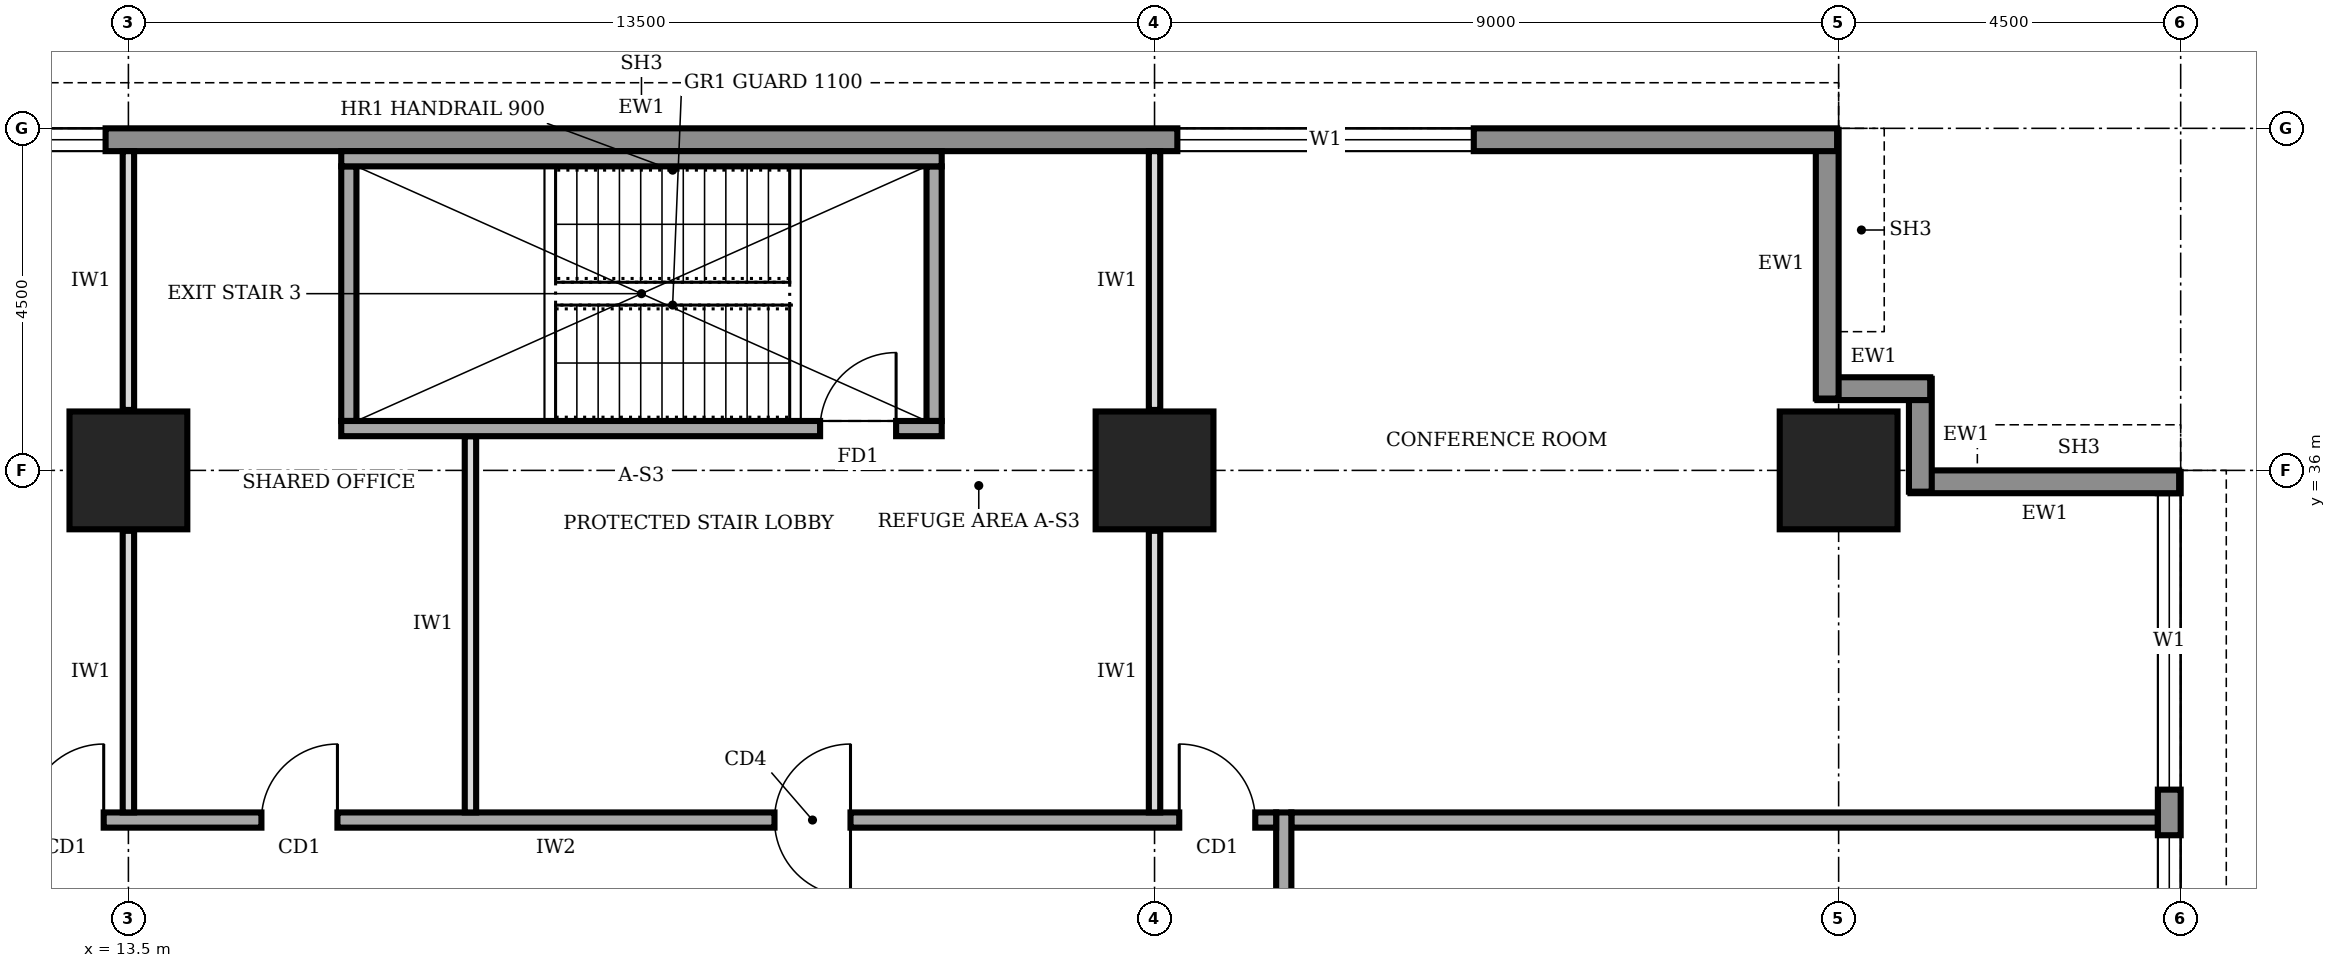
"""IFC4 building model, lengths in metres.
Left out: names, types, materials, properties, quantities, classifications, styles, units other than length and angle.
Written with IfcOpenShell. Run it as: python <this file> out.ifc"""

import sys

from ifc_helpers import new_model, si_unit, direction, frame, frame_2d, origin, origin_2d, place, context, subcontext, project, spatial, rectangle, extrude, element, fill, save


model = new_model("IFC4")
c1 = context("Model", 3, precision=1e-05, world=origin(), true_north=direction((0.0, 1.0)))
c2 = subcontext(c1, "Body", "Model", "MODEL_VIEW")
j1 = project(units=[si_unit("LENGTHUNIT", "METRE"), si_unit("PLANEANGLEUNIT", "RADIAN")], contexts=[c1])
p1 = place(None, origin())
s1 = spatial("IfcSite", under=j1, at=p1, CompositionType="ELEMENT")
p2 = place(p1, origin())
s2 = spatial("IfcBuilding", under=s1, at=p2, CompositionType="ELEMENT")
p3 = place(p2, frame((0.0, 0.0, 209.0)))
s3 = spatial("IfcBuildingStorey", under=s2, at=p3, CompositionType="ELEMENT", Elevation=209.0)
for number, where, z_axis, x_axis in (
    (1, (13.5, 36.0, 0.0), (0.0, 0.0, 1.0), (1.0, 0.0, 0.0)),
    (2, (27.0, 36.0, 0.0), (0.0, 0.0, 1.0), (1.0, 0.0, 0.0)),
    (3, (36.0, 36.0, 0.0), (0.0, 0.0, 1.0), (1.0, 0.0, 0.0)),
):
    element("IfcColumn", number, at=place(p3, frame(where, z_axis=z_axis, x_axis=x_axis)), inside=s3, PredefinedType="COLUMN", context=c2, shape_type="SweptSolid", body=[
        extrude(rectangle(XDim=1.55, YDim=1.55, at=origin_2d()), origin(), (0.0, 0.0, 1.0), 4.0),
    ])
p4 = place(p3, frame((40.35, 4.52, 0.0), z_axis=(0.0, 0.0, 1.0), x_axis=(0.0, 1.0, 0.0)))
e4 = element("IfcWall", 4, at=p4, inside=s3, PredefinedType="STANDARD", context=c2, shape_type="SweptSolid", body=[
    extrude(rectangle(XDim=31.46, YDim=0.3, at=frame_2d((15.73, 0.0))), origin(), (0.0, 0.0, 1.0), 3.75),
])
p5 = place(p4, frame((4.78, 0.0, 0.9)))
e5 = element("IfcOpeningElement", 5, at=p5, cuts=e4, PredefinedType="OPENING", context=c2, shape_type="SweptSolid", body=[
    extrude(rectangle(XDim=3.9, YDim=2.2, at=frame_2d((1.95, 1.1))), frame((0.0, 0.16, 0.0), z_axis=(0.0, -1.0, 0.0), x_axis=(1.0, 0.0, 0.0)), (0.0, 0.0, 1.0), 0.32),
])
p6 = place(p4, frame((9.28, 0.0, 0.9)))
e6 = element("IfcOpeningElement", 6, at=p6, cuts=e4, PredefinedType="OPENING", context=c2, shape_type="SweptSolid", body=[
    extrude(rectangle(XDim=3.9, YDim=2.2, at=frame_2d((1.95, 1.1))), frame((0.0, 0.16, 0.0), z_axis=(0.0, -1.0, 0.0), x_axis=(1.0, 0.0, 0.0)), (0.0, 0.0, 1.0), 0.32),
])
p7 = place(p4, frame((13.78, 0.0, 0.9)))
e7 = element("IfcOpeningElement", 7, at=p7, cuts=e4, PredefinedType="OPENING", context=c2, shape_type="SweptSolid", body=[
    extrude(rectangle(XDim=3.9, YDim=2.2, at=frame_2d((1.95, 1.1))), frame((0.0, 0.16, 0.0), z_axis=(0.0, -1.0, 0.0), x_axis=(1.0, 0.0, 0.0)), (0.0, 0.0, 1.0), 0.32),
])
p8 = place(p4, frame((18.28, 0.0, 0.9)))
e8 = element("IfcOpeningElement", 8, at=p8, cuts=e4, PredefinedType="OPENING", context=c2, shape_type="SweptSolid", body=[
    extrude(rectangle(XDim=3.9, YDim=2.2, at=frame_2d((1.95, 1.1))), frame((0.0, 0.16, 0.0), z_axis=(0.0, -1.0, 0.0), x_axis=(1.0, 0.0, 0.0)), (0.0, 0.0, 1.0), 0.32),
])
p9 = place(p4, frame((22.78, 0.0, 0.9)))
e9 = element("IfcOpeningElement", 9, at=p9, cuts=e4, PredefinedType="OPENING", context=c2, shape_type="SweptSolid", body=[
    extrude(rectangle(XDim=3.9, YDim=2.2, at=frame_2d((1.95, 1.1))), frame((0.0, 0.16, 0.0), z_axis=(0.0, -1.0, 0.0), x_axis=(1.0, 0.0, 0.0)), (0.0, 0.0, 1.0), 0.32),
])
p10 = place(p4, frame((27.28, 0.0, 0.9)))
e10 = element("IfcOpeningElement", 10, at=p10, cuts=e4, PredefinedType="OPENING", context=c2, shape_type="SweptSolid", body=[
    extrude(rectangle(XDim=3.9, YDim=2.2, at=frame_2d((1.95, 1.1))), frame((0.0, 0.16, 0.0), z_axis=(0.0, -1.0, 0.0), x_axis=(1.0, 0.0, 0.0)), (0.0, 0.0, 1.0), 0.32),
])
p11 = place(p3, frame((40.48, 35.85, 0.0), z_axis=(0.0, 0.0, 1.0), x_axis=(-1.0, 0.0, 0.0)))
e11 = element("IfcWall", 11, at=p11, inside=s3, PredefinedType="STANDARD", context=c2, shape_type="SweptSolid", body=[
    extrude(rectangle(XDim=3.535, YDim=0.3, at=frame_2d((1.768, 0.0))), origin(), (0.0, 0.0, 1.0), 2.85),
])
for number, where, z_axis, x_axis in (
    (12, (37.075, 35.72, 0.0), (0.0, 0.0, 1.0), (0.0, 1.0, 0.0)),
    (13, (37.205, 37.075, 0.0), (0.0, 0.0, 1.0), (-1.0, 0.0, 0.0)),
):
    element("IfcWall", number, at=place(p3, frame(where, z_axis=z_axis, x_axis=x_axis)), inside=s3, PredefinedType="STANDARD", context=c2, shape_type="SweptSolid", body=[
        extrude(rectangle(XDim=1.485, YDim=0.3, at=frame_2d((0.743, 0.0))), origin(), (0.0, 0.0, 1.0), 3.75),
    ])
p12 = place(p3, frame((35.85, 36.945, 0.0), z_axis=(0.0, 0.0, 1.0), x_axis=(0.0, 1.0, 0.0)))
e14 = element("IfcWall", 14, at=p12, inside=s3, PredefinedType="STANDARD", context=c2, shape_type="SweptSolid", body=[
    extrude(rectangle(XDim=3.535, YDim=0.3, at=frame_2d((1.768, 0.0))), origin(), (0.0, 0.0, 1.0), 2.85),
])
p13 = place(p3, frame((35.98, 40.35, 0.0), z_axis=(0.0, 0.0, 1.0), x_axis=(-1.0, 0.0, 0.0)))
e15 = element("IfcWall", 15, at=p13, inside=s3, PredefinedType="STANDARD", context=c2, shape_type="SweptSolid", body=[
    extrude(rectangle(XDim=31.46, YDim=0.3, at=frame_2d((15.73, 0.0))), origin(), (0.0, 0.0, 1.0), 3.75),
])
p14 = place(p13, frame((27.28, 0.0, 0.9)))
e16 = element("IfcOpeningElement", 16, at=p14, cuts=e15, PredefinedType="OPENING", context=c2, shape_type="SweptSolid", body=[
    extrude(rectangle(XDim=3.9, YDim=2.2, at=frame_2d((1.95, 1.1))), frame((0.0, 0.16, 0.0), z_axis=(0.0, -1.0, 0.0), x_axis=(1.0, 0.0, 0.0)), (0.0, 0.0, 1.0), 0.32),
])
p15 = place(p13, frame((22.78, 0.0, 0.9)))
e17 = element("IfcOpeningElement", 17, at=p15, cuts=e15, PredefinedType="OPENING", context=c2, shape_type="SweptSolid", body=[
    extrude(rectangle(XDim=3.9, YDim=2.2, at=frame_2d((1.95, 1.1))), frame((0.0, 0.16, 0.0), z_axis=(0.0, -1.0, 0.0), x_axis=(1.0, 0.0, 0.0)), (0.0, 0.0, 1.0), 0.32),
])
p16 = place(p13, frame((4.78, 0.0, 0.9)))
e18 = element("IfcOpeningElement", 18, at=p16, cuts=e15, PredefinedType="OPENING", context=c2, shape_type="SweptSolid", body=[
    extrude(rectangle(XDim=3.9, YDim=2.2, at=frame_2d((1.95, 1.1))), frame((0.0, 0.16, 0.0), z_axis=(0.0, -1.0, 0.0), x_axis=(1.0, 0.0, 0.0)), (0.0, 0.0, 1.0), 0.32),
])
p17 = place(p3, frame((28.7, 7.7, 0.0), z_axis=(0.0, 0.0, 1.0), x_axis=(0.0, 1.0, 0.0)))
e19 = element("IfcWall", 19, at=p17, inside=s3, PredefinedType="SOLIDWALL", context=c2, shape_type="SweptSolid", body=[
    extrude(rectangle(XDim=23.8, YDim=0.2, at=frame_2d((11.9, 0.0))), origin(), (0.0, 0.0, 1.0), 3.75),
])
p18 = place(p17, frame((4.15, 0.0, 0.0)))
e20 = element("IfcOpeningElement", 20, at=p18, cuts=e19, PredefinedType="OPENING", context=c2, shape_type="SweptSolid", body=[
    extrude(rectangle(XDim=1.8, YDim=2.1, at=frame_2d((0.9, 1.05))), frame((0.0, 0.11, 0.0), z_axis=(0.0, -1.0, 0.0), x_axis=(1.0, 0.0, 0.0)), (0.0, 0.0, 1.0), 0.22),
])
p19 = place(p17, frame((16.35, 0.0, 0.0)))
e21 = element("IfcOpeningElement", 21, at=p19, cuts=e19, PredefinedType="OPENING", context=c2, shape_type="SweptSolid", body=[
    extrude(rectangle(XDim=1.4, YDim=2.1, at=frame_2d((0.7, 1.05))), frame((0.0, 0.11, 0.0), z_axis=(0.0, -1.0, 0.0), x_axis=(1.0, 0.0, 0.0)), (0.0, 0.0, 1.0), 0.22),
])
p20 = place(p3, frame((28.6, 31.4, 0.0), z_axis=(0.0, 0.0, 1.0), x_axis=(-1.0, 0.0, 0.0)))
e22 = element("IfcWall", 22, at=p20, inside=s3, PredefinedType="SOLIDWALL", context=c2, shape_type="SweptSolid", body=[
    extrude(rectangle(XDim=16.9, YDim=0.2, at=frame_2d((8.45, 0.0))), origin(), (0.0, 0.0, 1.0), 3.75),
])
p21 = place(p20, frame((15.425, 0.0, 0.0)))
e23 = element("IfcOpeningElement", 23, at=p21, cuts=e22, PredefinedType="OPENING", context=c2, shape_type="SweptSolid", body=[
    extrude(rectangle(XDim=1.0, YDim=2.1, at=frame_2d((0.5, 1.05))), frame((0.0, 0.11, 0.0), z_axis=(0.0, -1.0, 0.0), x_axis=(1.0, 0.0, 0.0)), (0.0, 0.0, 1.0), 0.22),
])
p22 = place(p20, frame((12.35, 0.0, 0.0)))
e24 = element("IfcOpeningElement", 24, at=p22, cuts=e22, PredefinedType="OPENING", context=c2, shape_type="SweptSolid", body=[
    extrude(rectangle(XDim=1.0, YDim=2.1, at=frame_2d((0.5, 1.05))), frame((0.0, 0.11, 0.0), z_axis=(0.0, -1.0, 0.0), x_axis=(1.0, 0.0, 0.0)), (0.0, 0.0, 1.0), 0.22),
])
p23 = place(p20, frame((5.6, 0.0, 0.0)))
e25 = element("IfcOpeningElement", 25, at=p23, cuts=e22, PredefinedType="OPENING", context=c2, shape_type="SweptSolid", body=[
    extrude(rectangle(XDim=1.0, YDim=2.1, at=frame_2d((0.5, 1.05))), frame((0.0, 0.11, 0.0), z_axis=(0.0, -1.0, 0.0), x_axis=(1.0, 0.0, 0.0)), (0.0, 0.0, 1.0), 0.22),
])
p24 = place(p20, frame((0.275, 0.0, 0.0)))
e26 = element("IfcOpeningElement", 26, at=p24, cuts=e22, PredefinedType="OPENING", context=c2, shape_type="SweptSolid", body=[
    extrude(rectangle(XDim=1.0, YDim=2.1, at=frame_2d((0.5, 1.05))), frame((0.0, 0.11, 0.0), z_axis=(0.0, -1.0, 0.0), x_axis=(1.0, 0.0, 0.0)), (0.0, 0.0, 1.0), 0.22),
])
p25 = place(p3, frame((28.8, 31.4, 0.0), z_axis=(0.0, 0.0, 1.0), x_axis=(1.0, 0.0, 0.0)))
e27 = element("IfcWall", 27, at=p25, inside=s3, PredefinedType="SOLIDWALL", context=c2, shape_type="SweptSolid", body=[
    extrude(rectangle(XDim=11.4, YDim=0.2, at=frame_2d((5.7, 0.0))), origin(), (0.0, 0.0, 1.0), 3.75),
])
p26 = place(p3, frame((13.5, 31.5, 0.0), z_axis=(0.0, 0.0, 1.0), x_axis=(0.0, 1.0, 0.0)))
e28 = element("IfcWall", 28, at=p26, inside=s3, PredefinedType="PARTITIONING", context=c2, shape_type="SweptSolid", body=[
    extrude(rectangle(XDim=3.705, YDim=0.15, at=frame_2d((1.853, 0.0))), origin(), (0.0, 0.0, 1.0), 2.85),
])
p27 = place(p3, frame((13.5, 36.795, 0.0), z_axis=(0.0, 0.0, 1.0), x_axis=(0.0, 1.0, 0.0)))
e29 = element("IfcWall", 29, at=p27, inside=s3, PredefinedType="PARTITIONING", context=c2, shape_type="SweptSolid", body=[
    extrude(rectangle(XDim=3.405, YDim=0.15, at=frame_2d((1.703, 0.0))), origin(), (0.0, 0.0, 1.0), 2.85),
])
p28 = place(p3, frame((18.0, 31.5, 0.0), z_axis=(0.0, 0.0, 1.0), x_axis=(0.0, 1.0, 0.0)))
e30 = element("IfcWall", 30, at=p28, inside=s3, PredefinedType="PARTITIONING", context=c2, shape_type="SweptSolid", body=[
    extrude(rectangle(XDim=4.95, YDim=0.15, at=frame_2d((2.475, 0.0))), origin(), (0.0, 0.0, 1.0), 3.75),
])
p29 = place(p3, frame((27.0, 31.5, 0.0), z_axis=(0.0, 0.0, 1.0), x_axis=(0.0, 1.0, 0.0)))
e31 = element("IfcWall", 31, at=p29, inside=s3, PredefinedType="PARTITIONING", context=c2, shape_type="SweptSolid", body=[
    extrude(rectangle(XDim=3.705, YDim=0.15, at=frame_2d((1.853, 0.0))), origin(), (0.0, 0.0, 1.0), 2.85),
])
p30 = place(p3, frame((27.0, 36.795, 0.0), z_axis=(0.0, 0.0, 1.0), x_axis=(0.0, 1.0, 0.0)))
e32 = element("IfcWall", 32, at=p30, inside=s3, PredefinedType="PARTITIONING", context=c2, shape_type="SweptSolid", body=[
    extrude(rectangle(XDim=3.405, YDim=0.15, at=frame_2d((1.703, 0.0))), origin(), (0.0, 0.0, 1.0), 2.85),
])
p31 = place(p3, frame((16.3, 36.55, 0.0), z_axis=(0.0, 0.0, 1.0), x_axis=(1.0, 0.0, 0.0)))
e33 = element("IfcWall", 33, at=p31, inside=s3, PredefinedType="SOLIDWALL", context=c2, shape_type="SweptSolid", body=[
    extrude(rectangle(XDim=7.9, YDim=0.2, at=frame_2d((3.95, 0.0))), origin(), (0.0, 0.0, 1.0), 3.75),
])
p32 = place(p31, frame((6.3, 0.0, 0.0)))
e34 = element("IfcOpeningElement", 34, at=p32, cuts=e33, PredefinedType="OPENING", context=c2, shape_type="SweptSolid", body=[
    extrude(rectangle(XDim=1.0, YDim=2.1, at=frame_2d((0.5, 1.05))), frame((0.0, 0.11, 0.0), z_axis=(0.0, -1.0, 0.0), x_axis=(1.0, 0.0, 0.0)), (0.0, 0.0, 1.0), 0.22),
])
p33 = place(p3, frame((16.3, 40.1, 0.0), z_axis=(0.0, 0.0, 1.0), x_axis=(1.0, 0.0, 0.0)))
e35 = element("IfcWall", 35, at=p33, inside=s3, PredefinedType="SOLIDWALL", context=c2, shape_type="SweptSolid", body=[
    extrude(rectangle(XDim=7.9, YDim=0.2, at=frame_2d((3.95, 0.0))), origin(), (0.0, 0.0, 1.0), 3.75),
])
for number, where, z_axis, x_axis in (
    (36, (16.4, 36.65, 0.0), (0.0, 0.0, 1.0), (0.0, 1.0, 0.0)),
    (37, (24.1, 36.65, 0.0), (0.0, 0.0, 1.0), (0.0, 1.0, 0.0)),
):
    element("IfcWall", number, at=place(p3, frame(where, z_axis=z_axis, x_axis=x_axis)), inside=s3, PredefinedType="SOLIDWALL", context=c2, shape_type="SweptSolid", body=[
        extrude(rectangle(XDim=3.35, YDim=0.2, at=frame_2d((1.675, 0.0))), origin(), (0.0, 0.0, 1.0), 3.75),
    ])
p34 = place(p9, origin())
e38 = element("IfcWindow", 38, at=p34, inside=s3, PartitioningType="SINGLE_PANEL", PredefinedType="WINDOW", context=c2, shape_type="SweptSolid", body=[
    extrude(rectangle(XDim=3.9, YDim=2.2, at=frame_2d((1.95, 1.1))), frame((0.0, 0.03, 0.0), z_axis=(0.0, -1.0, 0.0), x_axis=(1.0, 0.0, 0.0)), (0.0, 0.0, 1.0), 0.06),
])
fill(e9, e38)
p35 = place(p10, origin())
e39 = element("IfcWindow", 39, at=p35, inside=s3, PartitioningType="SINGLE_PANEL", PredefinedType="WINDOW", context=c2, shape_type="SweptSolid", body=[
    extrude(rectangle(XDim=3.9, YDim=2.2, at=frame_2d((1.95, 1.1))), frame((0.0, 0.03, 0.0), z_axis=(0.0, -1.0, 0.0), x_axis=(1.0, 0.0, 0.0)), (0.0, 0.0, 1.0), 0.06),
])
fill(e10, e39)
p36 = place(p15, origin())
e40 = element("IfcWindow", 40, at=p36, inside=s3, PartitioningType="SINGLE_PANEL", PredefinedType="WINDOW", context=c2, shape_type="SweptSolid", body=[
    extrude(rectangle(XDim=3.9, YDim=2.2, at=frame_2d((1.95, 1.1))), frame((0.0, 0.03, 0.0), z_axis=(0.0, -1.0, 0.0), x_axis=(1.0, 0.0, 0.0)), (0.0, 0.0, 1.0), 0.06),
])
fill(e17, e40)
p37 = place(p16, origin())
e41 = element("IfcWindow", 41, at=p37, inside=s3, PartitioningType="SINGLE_PANEL", PredefinedType="WINDOW", context=c2, shape_type="SweptSolid", body=[
    extrude(rectangle(XDim=3.9, YDim=2.2, at=frame_2d((1.95, 1.1))), frame((0.0, 0.03, 0.0), z_axis=(0.0, -1.0, 0.0), x_axis=(1.0, 0.0, 0.0)), (0.0, 0.0, 1.0), 0.06),
])
fill(e18, e41)
p38 = place(p21, frame((1.0, 0.0, 0.0), z_axis=(0.0, 0.0, 1.0), x_axis=(-1.0, 0.0, 0.0)))
e42 = element("IfcDoor", 42, at=p38, inside=s3, OperationType="SINGLE_SWING_RIGHT", PredefinedType="DOOR", context=c2, shape_type="SweptSolid", body=[
    extrude(rectangle(XDim=1.0, YDim=2.1, at=frame_2d((0.5, 1.05))), frame((0.0, 0.025, 0.0), z_axis=(0.0, -1.0, 0.0), x_axis=(1.0, 0.0, 0.0)), (0.0, 0.0, 1.0), 0.05),
])
fill(e23, e42)
p39 = place(p22, frame((1.0, 0.0, 0.0), z_axis=(0.0, 0.0, 1.0), x_axis=(-1.0, 0.0, 0.0)))
e43 = element("IfcDoor", 43, at=p39, inside=s3, OperationType="SINGLE_SWING_RIGHT", PredefinedType="DOOR", context=c2, shape_type="SweptSolid", body=[
    extrude(rectangle(XDim=1.0, YDim=2.1, at=frame_2d((0.5, 1.05))), frame((0.0, 0.025, 0.0), z_axis=(0.0, -1.0, 0.0), x_axis=(1.0, 0.0, 0.0)), (0.0, 0.0, 1.0), 0.05),
])
fill(e24, e43)
p40 = place(p23, origin())
e44 = element("IfcDoor", 44, at=p40, inside=s3, OperationType="DOUBLE_SWING_LEFT", PredefinedType="DOOR", context=c2, shape_type="SweptSolid", body=[
    extrude(rectangle(XDim=1.0, YDim=2.1, at=frame_2d((0.5, 1.05))), frame((0.0, 0.025, 0.0), z_axis=(0.0, -1.0, 0.0), x_axis=(1.0, 0.0, 0.0)), (0.0, 0.0, 1.0), 0.05),
])
fill(e25, e44)
p41 = place(p24, frame((1.0, 0.0, 0.0), z_axis=(0.0, 0.0, 1.0), x_axis=(-1.0, 0.0, 0.0)))
e45 = element("IfcDoor", 45, at=p41, inside=s3, OperationType="SINGLE_SWING_LEFT", PredefinedType="DOOR", context=c2, shape_type="SweptSolid", body=[
    extrude(rectangle(XDim=1.0, YDim=2.1, at=frame_2d((0.5, 1.05))), frame((0.0, 0.025, 0.0), z_axis=(0.0, -1.0, 0.0), x_axis=(1.0, 0.0, 0.0)), (0.0, 0.0, 1.0), 0.05),
])
fill(e26, e45)
p42 = place(p32, origin())
e46 = element("IfcDoor", 46, at=p42, inside=s3, OperationType="SINGLE_SWING_RIGHT", PredefinedType="DOOR", context=c2, shape_type="SweptSolid", body=[
    extrude(rectangle(XDim=1.0, YDim=2.1, at=frame_2d((0.5, 1.05))), frame((0.0, 0.025, 0.0), z_axis=(0.0, -1.0, 0.0), x_axis=(1.0, 0.0, 0.0)), (0.0, 0.0, 1.0), 0.05),
])
fill(e34, e46)
save(model, sys.argv[1])
